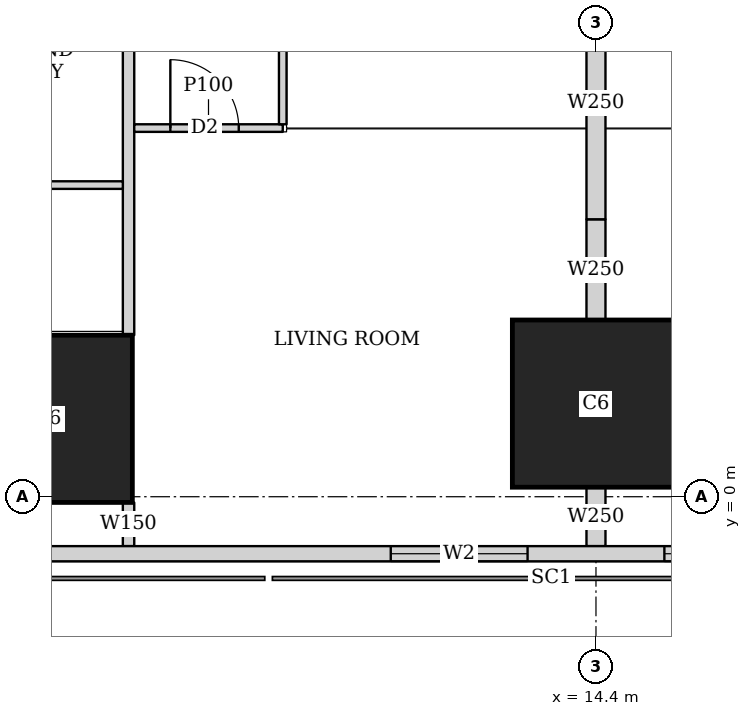
"""IFC4 building model, lengths in metres.
Left out: names, types, materials, properties, quantities, classifications, styles, units other than length and angle.
Written with IfcOpenShell. Run it as: python <this file> out.ifc"""

import sys

from ifc_helpers import new_model, si_unit, direction, frame, frame_2d, origin, origin_2d, place, context, subcontext, project, spatial, rectangle, extrude, element, fill, save


model = new_model("IFC4")
c1 = context("Model", 3, precision=1e-05, world=origin(), true_north=direction((0.0, 1.0)))
c2 = subcontext(c1, "Body", "Model", "MODEL_VIEW")
j1 = project(units=[si_unit("LENGTHUNIT", "METRE"), si_unit("PLANEANGLEUNIT", "RADIAN")], contexts=[c1])
p1 = place(None, origin())
s1 = spatial("IfcSite", under=j1, at=p1, CompositionType="ELEMENT")
p2 = place(p1, origin())
s2 = spatial("IfcBuilding", under=s1, at=p2, CompositionType="ELEMENT")
p3 = place(p2, frame((0.0, 0.0, 81.65)))
s3 = spatial("IfcBuildingStorey", under=s2, at=p3, CompositionType="ELEMENT", Elevation=81.65)
for number, where, z_axis, x_axis in (
    (1, (7.2, 1.025, 0.0), (0.0, 0.0, 1.0), (1.0, 0.0, 0.0)),
    (2, (14.4, 1.225, 0.0), (0.0, 0.0, 1.0), (1.0, 0.0, 0.0)),
):
    element("IfcColumn", number, at=place(p3, frame(where, z_axis=z_axis, x_axis=x_axis)), inside=s3, PredefinedType="COLUMN", context=c2, shape_type="SweptSolid", body=[
        extrude(rectangle(XDim=2.2, YDim=2.2, at=origin_2d()), origin(), (0.0, 0.0, 1.0), 3.75),
    ])
p4 = place(p3, frame((2.163, -0.75, 0.0), z_axis=(0.0, 0.0, 1.0), x_axis=(1.0, 0.0, 0.0)))
e3 = element("IfcWall", 3, at=p4, inside=s3, PredefinedType="SOLIDWALL", context=c2, shape_type="SweptSolid", body=[
    extrude(rectangle(XDim=45.628, YDim=0.2, at=frame_2d((22.814, 0.0))), origin(), (0.0, 0.0, 1.0), 3.5),
])
p5 = place(p4, frame((9.537, 0.0, 0.9)))
e4 = element("IfcOpeningElement", 4, at=p5, cuts=e3, PredefinedType="OPENING", context=c2, shape_type="SweptSolid", body=[
    extrude(rectangle(XDim=1.8, YDim=1.5, at=frame_2d((0.9, 0.75))), frame((0.0, 0.11, 0.0), z_axis=(0.0, -1.0, 0.0), x_axis=(1.0, 0.0, 0.0)), (0.0, 0.0, 1.0), 0.22),
])
p6 = place(p4, frame((13.137, 0.0, 0.9)))
e5 = element("IfcOpeningElement", 5, at=p6, cuts=e3, PredefinedType="OPENING", context=c2, shape_type="SweptSolid", body=[
    extrude(rectangle(XDim=1.8, YDim=1.5, at=frame_2d((0.9, 0.75))), frame((0.0, 0.11, 0.0), z_axis=(0.0, -1.0, 0.0), x_axis=(1.0, 0.0, 0.0)), (0.0, 0.0, 1.0), 0.22),
])
p7 = place(p4, frame((16.737, 0.0, 0.9)))
e6 = element("IfcOpeningElement", 6, at=p7, cuts=e3, PredefinedType="OPENING", context=c2, shape_type="SweptSolid", body=[
    extrude(rectangle(XDim=1.8, YDim=1.5, at=frame_2d((0.9, 0.75))), frame((0.0, 0.11, 0.0), z_axis=(0.0, -1.0, 0.0), x_axis=(1.0, 0.0, 0.0)), (0.0, 0.0, 1.0), 0.22),
])
p8 = place(p4, frame((20.337, 0.0, 0.9)))
e7 = element("IfcOpeningElement", 7, at=p8, cuts=e3, PredefinedType="OPENING", context=c2, shape_type="SweptSolid", body=[
    extrude(rectangle(XDim=1.8, YDim=1.5, at=frame_2d((0.9, 0.75))), frame((0.0, 0.11, 0.0), z_axis=(0.0, -1.0, 0.0), x_axis=(1.0, 0.0, 0.0)), (0.0, 0.0, 1.0), 0.22),
])
p9 = place(p4, frame((23.937, 0.0, 0.9)))
e8 = element("IfcOpeningElement", 8, at=p9, cuts=e3, PredefinedType="OPENING", context=c2, shape_type="SweptSolid", body=[
    extrude(rectangle(XDim=1.8, YDim=1.5, at=frame_2d((0.9, 0.75))), frame((0.0, 0.11, 0.0), z_axis=(0.0, -1.0, 0.0), x_axis=(1.0, 0.0, 0.0)), (0.0, 0.0, 1.0), 0.22),
])
p10 = place(p4, frame((27.537, 0.0, 0.9)))
e9 = element("IfcOpeningElement", 9, at=p10, cuts=e3, PredefinedType="OPENING", context=c2, shape_type="SweptSolid", body=[
    extrude(rectangle(XDim=1.8, YDim=1.5, at=frame_2d((0.9, 0.75))), frame((0.0, 0.11, 0.0), z_axis=(0.0, -1.0, 0.0), x_axis=(1.0, 0.0, 0.0)), (0.0, 0.0, 1.0), 0.22),
])
p11 = place(p4, frame((31.137, 0.0, 0.9)))
e10 = element("IfcOpeningElement", 10, at=p11, cuts=e3, PredefinedType="OPENING", context=c2, shape_type="SweptSolid", body=[
    extrude(rectangle(XDim=1.8, YDim=1.5, at=frame_2d((0.9, 0.75))), frame((0.0, 0.11, 0.0), z_axis=(0.0, -1.0, 0.0), x_axis=(1.0, 0.0, 0.0)), (0.0, 0.0, 1.0), 0.22),
])
p12 = place(p4, frame((34.737, 0.0, 0.9)))
e11 = element("IfcOpeningElement", 11, at=p12, cuts=e3, PredefinedType="OPENING", context=c2, shape_type="SweptSolid", body=[
    extrude(rectangle(XDim=1.8, YDim=1.5, at=frame_2d((0.9, 0.75))), frame((0.0, 0.11, 0.0), z_axis=(0.0, -1.0, 0.0), x_axis=(1.0, 0.0, 0.0)), (0.0, 0.0, 1.0), 0.22),
])
p13 = place(p3, frame((8.25, -0.65, 0.0), z_axis=(0.0, 0.0, 1.0), x_axis=(0.0, 1.0, 0.0)))
e12 = element("IfcWall", 12, at=p13, inside=s3, PredefinedType="SOLIDWALL", context=c2, shape_type="SweptSolid", body=[
    extrude(rectangle(XDim=0.574, YDim=0.15, at=frame_2d((0.287, 0.0))), origin(), (0.0, 0.0, 1.0), 3.5),
])
p14 = place(p3, frame((8.25, 2.126, 0.0), z_axis=(0.0, 0.0, 1.0), x_axis=(0.0, 1.0, 0.0)))
e13 = element("IfcWall", 13, at=p14, inside=s3, PredefinedType="SOLIDWALL", context=c2, shape_type="SweptSolid", body=[
    extrude(rectangle(XDim=40.773, YDim=0.15, at=frame_2d((20.386, 0.0))), origin(), (0.0, 0.0, 1.0), 3.5),
])
p15 = place(p14, frame((17.787, 0.0, 0.0)))
e14 = element("IfcOpeningElement", 14, at=p15, cuts=e13, PredefinedType="OPENING", context=c2, shape_type="SweptSolid", body=[
    extrude(rectangle(XDim=1.0, YDim=2.1, at=frame_2d((0.5, 1.05))), frame((0.0, 0.085, 0.0), z_axis=(0.0, -1.0, 0.0), x_axis=(1.0, 0.0, 0.0)), (0.0, 0.0, 1.0), 0.17),
])
p16 = place(p14, frame((21.962, 0.0, 0.0)))
e15 = element("IfcOpeningElement", 15, at=p16, cuts=e13, PredefinedType="OPENING", context=c2, shape_type="SweptSolid", body=[
    extrude(rectangle(XDim=1.0, YDim=2.1, at=frame_2d((0.5, 1.05))), frame((0.0, 0.085, 0.0), z_axis=(0.0, -1.0, 0.0), x_axis=(1.0, 0.0, 0.0)), (0.0, 0.0, 1.0), 0.17),
])
p17 = place(p14, frame((32.787, 0.0, 0.0)))
e16 = element("IfcOpeningElement", 16, at=p17, cuts=e13, PredefinedType="OPENING", context=c2, shape_type="SweptSolid", body=[
    extrude(rectangle(XDim=1.0, YDim=2.1, at=frame_2d((0.5, 1.05))), frame((0.0, 0.085, 0.0), z_axis=(0.0, -1.0, 0.0), x_axis=(1.0, 0.0, 0.0)), (0.0, 0.0, 1.0), 0.17),
])
p18 = place(p3, frame((10.279, 4.85, 0.0), z_axis=(0.0, 0.0, 1.0), x_axis=(-1.0, 0.0, 0.0)))
e17 = element("IfcWall", 17, at=p18, inside=s3, PredefinedType="PARTITIONING", context=c2, shape_type="SweptSolid", body=[
    extrude(rectangle(XDim=1.954, YDim=0.1, at=frame_2d((0.977, 0.0))), origin(), (0.0, 0.0, 1.0), 3.5),
])
p19 = place(p18, frame((0.579, 0.0, 0.0)))
e18 = element("IfcOpeningElement", 18, at=p19, cuts=e17, PredefinedType="OPENING", context=c2, shape_type="SweptSolid", body=[
    extrude(rectangle(XDim=0.9, YDim=2.1, at=frame_2d((0.45, 1.05))), frame((0.0, 0.06, 0.0), z_axis=(0.0, -1.0, 0.0), x_axis=(1.0, 0.0, 0.0)), (0.0, 0.0, 1.0), 0.12),
])
p20 = place(p3, frame((10.279, 4.9, 0.0), z_axis=(0.0, 0.0, 1.0), x_axis=(0.0, 1.0, 0.0)))
e19 = element("IfcWall", 19, at=p20, inside=s3, PredefinedType="PARTITIONING", context=c2, shape_type="SweptSolid", body=[
    extrude(rectangle(XDim=3.275, YDim=0.1, at=frame_2d((1.638, 0.0))), origin(), (0.0, 0.0, 1.0), 3.5),
])
p21 = place(p3, frame((14.4, -0.65, 0.0), z_axis=(0.0, 0.0, 1.0), x_axis=(0.0, 1.0, 0.0)))
e20 = element("IfcWall", 20, at=p21, inside=s3, PredefinedType="SOLIDWALL", context=c2, shape_type="SweptSolid", body=[
    extrude(rectangle(XDim=0.774, YDim=0.25, at=frame_2d((0.387, 0.0))), origin(), (0.0, 0.0, 1.0), 3.5),
])
p22 = place(p3, frame((14.4, 2.326, 0.0), z_axis=(0.0, 0.0, 1.0), x_axis=(0.0, 1.0, 0.0)))
e21 = element("IfcWall", 21, at=p22, inside=s3, PredefinedType="SOLIDWALL", context=c2, shape_type="SweptSolid", body=[
    extrude(rectangle(XDim=1.324, YDim=0.25, at=frame_2d((0.662, 0.0))), origin(), (0.0, 0.0, 1.0), 3.5),
])
p23 = place(p3, frame((14.4, 3.65, 0.0), z_axis=(0.0, 0.0, 1.0), x_axis=(0.0, 1.0, 0.0)))
e22 = element("IfcWall", 22, at=p23, inside=s3, PredefinedType="SOLIDWALL", context=c2, shape_type="SweptSolid", body=[
    extrude(rectangle(XDim=3.049, YDim=0.25, at=frame_2d((1.524, 0.0))), origin(), (0.0, 0.0, 1.0), 3.5),
])
p24 = place(p3, frame((8.175, 4.1, 0.0), z_axis=(0.0, 0.0, 1.0), x_axis=(-1.0, 0.0, 0.0)))
e23 = element("IfcWall", 23, at=p24, inside=s3, PredefinedType="PARTITIONING", context=c2, shape_type="SweptSolid", body=[
    extrude(rectangle(XDim=3.275, YDim=0.1, at=frame_2d((1.638, 0.0))), origin(), (0.0, 0.0, 1.0), 3.5),
])
p25 = place(p24, frame((1.175, 0.0, 0.0)))
e24 = element("IfcOpeningElement", 24, at=p25, cuts=e23, PredefinedType="OPENING", context=c2, shape_type="SweptSolid", body=[
    extrude(rectangle(XDim=0.9, YDim=2.1, at=frame_2d((0.45, 1.05))), frame((0.0, 0.06, 0.0), z_axis=(0.0, -1.0, 0.0), x_axis=(1.0, 0.0, 0.0)), (0.0, 0.0, 1.0), 0.12),
])
p26 = place(p5, origin())
e25 = element("IfcWindow", 25, at=p26, inside=s3, PartitioningType="SINGLE_PANEL", PredefinedType="WINDOW", context=c2, shape_type="SweptSolid", body=[
    extrude(rectangle(XDim=1.8, YDim=1.5, at=frame_2d((0.9, 0.75))), frame((0.0, 0.03, 0.0), z_axis=(0.0, -1.0, 0.0), x_axis=(1.0, 0.0, 0.0)), (0.0, 0.0, 1.0), 0.06),
])
fill(e4, e25)
p27 = place(p6, origin())
e26 = element("IfcWindow", 26, at=p27, inside=s3, PartitioningType="SINGLE_PANEL", PredefinedType="WINDOW", context=c2, shape_type="SweptSolid", body=[
    extrude(rectangle(XDim=1.8, YDim=1.5, at=frame_2d((0.9, 0.75))), frame((0.0, 0.03, 0.0), z_axis=(0.0, -1.0, 0.0), x_axis=(1.0, 0.0, 0.0)), (0.0, 0.0, 1.0), 0.06),
])
fill(e5, e26)
p28 = place(p19, origin())
e27 = element("IfcDoor", 27, at=p28, inside=s3, OperationType="SINGLE_SWING_LEFT", PredefinedType="DOOR", context=c2, shape_type="SweptSolid", body=[
    extrude(rectangle(XDim=0.9, YDim=2.1, at=frame_2d((0.45, 1.05))), frame((0.0, 0.025, 0.0), z_axis=(0.0, -1.0, 0.0), x_axis=(1.0, 0.0, 0.0)), (0.0, 0.0, 1.0), 0.05),
])
fill(e18, e27)
save(model, sys.argv[1])
